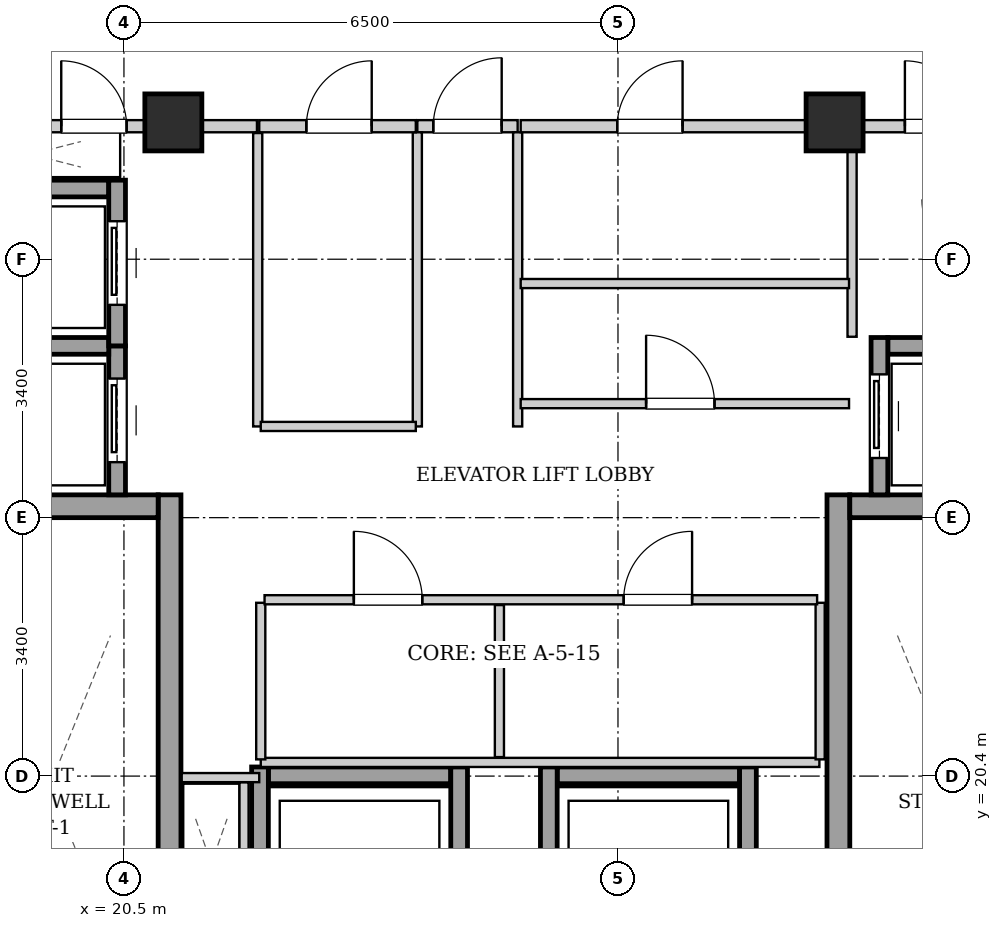
"""IFC4 building model, lengths in metres.
Left out: names, types, materials, properties, quantities, classifications, styles, units other than length and angle.
Written with IfcOpenShell. Run it as: python <this file> out.ifc"""

import sys

from ifc_helpers import new_model, si_unit, direction, frame, frame_2d, origin, origin_2d, place, context, subcontext, project, spatial, rectangle, extrude, element, fill, save


model = new_model("IFC4")
c1 = context("Model", 3, precision=1e-05, world=origin(), true_north=direction((0.0, 1.0)))
c2 = subcontext(c1, "Body", "Model", "MODEL_VIEW")
j1 = project(units=[si_unit("LENGTHUNIT", "METRE"), si_unit("PLANEANGLEUNIT", "RADIAN")], contexts=[c1])
p1 = place(None, origin())
s1 = spatial("IfcSite", under=j1, at=p1, CompositionType="ELEMENT")
p2 = place(p1, origin())
s2 = spatial("IfcBuilding", under=s1, at=p2, CompositionType="ELEMENT")
p3 = place(p2, frame((0.0, 0.0, 251.3)))
s3 = spatial("IfcBuildingStorey", under=s2, at=p3, CompositionType="ELEMENT", Elevation=251.3)
for number, where, z_axis, x_axis in (
    (1, (21.15, 29.0, 0.0), (0.0, 0.0, 1.0), (1.0, 0.0, 0.0)),
    (2, (29.85, 29.0, 0.0), (0.0, 0.0, 1.0), (1.0, 0.0, 0.0)),
):
    element("IfcColumn", number, at=place(p3, frame(where, z_axis=z_axis, x_axis=x_axis)), inside=s3, PredefinedType="COLUMN", context=c2, shape_type="SweptSolid", body=[
        extrude(rectangle(XDim=0.75, YDim=0.75, at=origin_2d()), origin(), (0.0, 0.0, 1.0), 3.4),
    ])
p4 = place(p3, frame((21.1, 15.1, 0.0), z_axis=(0.0, 0.0, 1.0), x_axis=(0.0, 1.0, 0.0)))
e3 = element("IfcWall", 3, at=p4, inside=s3, PredefinedType="SHEAR", context=c2, shape_type="SweptSolid", body=[
    extrude(rectangle(XDim=9.0, YDim=0.3, at=frame_2d((4.5, 0.0))), origin(), (0.0, 0.0, 1.0), 3.14),
])
p5 = place(p3, frame((18.1, 23.95, 0.0), z_axis=(0.0, 0.0, 1.0), x_axis=(1.0, 0.0, 0.0)))
e4 = element("IfcWall", 4, at=p5, inside=s3, PredefinedType="SHEAR", context=c2, shape_type="SweptSolid", body=[
    extrude(rectangle(XDim=2.85, YDim=0.3, at=frame_2d((1.425, 0.0))), origin(), (0.0, 0.0, 1.0), 3.14),
])
p6 = place(p3, frame((29.9, 15.1, 0.0), z_axis=(0.0, 0.0, 1.0), x_axis=(0.0, 1.0, 0.0)))
e5 = element("IfcWall", 5, at=p6, inside=s3, PredefinedType="SHEAR", context=c2, shape_type="SweptSolid", body=[
    extrude(rectangle(XDim=9.0, YDim=0.3, at=frame_2d((4.5, 0.0))), origin(), (0.0, 0.0, 1.0), 3.14),
])
p7 = place(p3, frame((30.05, 23.95, 0.0), z_axis=(0.0, 0.0, 1.0), x_axis=(1.0, 0.0, 0.0)))
e6 = element("IfcWall", 6, at=p7, inside=s3, PredefinedType="SHEAR", context=c2, shape_type="SweptSolid", body=[
    extrude(rectangle(XDim=2.85, YDim=0.3, at=frame_2d((1.425, 0.0))), origin(), (0.0, 0.0, 1.0), 3.14),
])
p8 = place(p3, frame((20.41, 24.1, 0.0), z_axis=(0.0, 0.0, 1.0), x_axis=(0.0, 1.0, 0.0)))
e7 = element("IfcWall", 7, at=p8, inside=s3, PredefinedType="SHEAR", context=c2, shape_type="SweptSolid", body=[
    extrude(rectangle(XDim=1.96, YDim=0.22, at=frame_2d((0.98, 0.0))), origin(), (0.0, 0.0, 1.0), 3.14),
])
p9 = place(p8, frame((0.43, 0.0, 0.0)))
e8 = element("IfcOpeningElement", 8, at=p9, cuts=e7, PredefinedType="OPENING", context=c2, shape_type="SweptSolid", body=[
    extrude(rectangle(XDim=1.1, YDim=2.15, at=frame_2d((0.55, 1.075))), frame((0.0, 0.12, 0.0), z_axis=(0.0, -1.0, 0.0), x_axis=(1.0, 0.0, 0.0)), (0.0, 0.0, 1.0), 0.24),
])
for number, where, z_axis, x_axis in (
    (9, (18.4, 26.06, 0.0), (0.0, 0.0, 1.0), (1.0, 0.0, 0.0)),
    (10, (18.4, 28.13, 0.0), (0.0, 0.0, 1.0), (1.0, 0.0, 0.0)),
):
    element("IfcWall", number, at=place(p3, frame(where, z_axis=z_axis, x_axis=x_axis)), inside=s3, PredefinedType="SHEAR", context=c2, shape_type="SweptSolid", body=[
        extrude(rectangle(XDim=1.9, YDim=0.22, at=frame_2d((0.95, 0.0))), origin(), (0.0, 0.0, 1.0), 3.14),
    ])
p10 = place(p3, frame((20.41, 26.06, 0.0), z_axis=(0.0, 0.0, 1.0), x_axis=(0.0, 1.0, 0.0)))
e11 = element("IfcWall", 11, at=p10, inside=s3, PredefinedType="SHEAR", context=c2, shape_type="SweptSolid", body=[
    extrude(rectangle(XDim=2.18, YDim=0.22, at=frame_2d((1.09, 0.0))), origin(), (0.0, 0.0, 1.0), 3.14),
])
p11 = place(p10, frame((0.54, 0.0, 0.0)))
e12 = element("IfcOpeningElement", 12, at=p11, cuts=e11, PredefinedType="OPENING", context=c2, shape_type="SweptSolid", body=[
    extrude(rectangle(XDim=1.1, YDim=2.15, at=frame_2d((0.55, 1.075))), frame((0.0, 0.12, 0.0), z_axis=(0.0, -1.0, 0.0), x_axis=(1.0, 0.0, 0.0)), (0.0, 0.0, 1.0), 0.24),
])
p12 = place(p3, frame((30.55, 26.06, 0.0), z_axis=(0.0, 0.0, 1.0), x_axis=(1.0, 0.0, 0.0)))
e13 = element("IfcWall", 13, at=p12, inside=s3, PredefinedType="SHEAR", context=c2, shape_type="SweptSolid", body=[
    extrude(rectangle(XDim=1.9, YDim=0.22, at=frame_2d((0.95, 0.0))), origin(), (0.0, 0.0, 1.0), 3.14),
])
p13 = place(p3, frame((30.44, 24.1, 0.0), z_axis=(0.0, 0.0, 1.0), x_axis=(0.0, 1.0, 0.0)))
e14 = element("IfcWall", 14, at=p13, inside=s3, PredefinedType="SHEAR", context=c2, shape_type="SweptSolid", body=[
    extrude(rectangle(XDim=2.07, YDim=0.22, at=frame_2d((1.035, 0.0))), origin(), (0.0, 0.0, 1.0), 3.14),
])
p14 = place(p13, frame((0.485, 0.0, 0.0)))
e15 = element("IfcOpeningElement", 15, at=p14, cuts=e14, PredefinedType="OPENING", context=c2, shape_type="SweptSolid", body=[
    extrude(rectangle(XDim=1.1, YDim=2.15, at=frame_2d((0.55, 1.075))), frame((0.0, 0.12, 0.0), z_axis=(0.0, -1.0, 0.0), x_axis=(1.0, 0.0, 0.0)), (0.0, 0.0, 1.0), 0.24),
])
p15 = place(p3, frame((22.4, 20.41, 0.0), z_axis=(0.0, 0.0, 1.0), x_axis=(1.0, 0.0, 0.0)))
e16 = element("IfcWall", 16, at=p15, inside=s3, PredefinedType="SHEAR", context=c2, shape_type="SweptSolid", body=[
    extrude(rectangle(XDim=2.4, YDim=0.22, at=frame_2d((1.2, 0.0))), origin(), (0.0, 0.0, 1.0), 3.14),
])
for number, where, z_axis, x_axis in (
    (17, (22.29, 17.98, 0.0), (0.0, 0.0, 1.0), (0.0, 1.0, 0.0)),
    (18, (24.91, 17.98, 0.0), (0.0, 0.0, 1.0), (0.0, 1.0, 0.0)),
):
    element("IfcWall", number, at=place(p3, frame(where, z_axis=z_axis, x_axis=x_axis)), inside=s3, PredefinedType="SHEAR", context=c2, shape_type="SweptSolid", body=[
        extrude(rectangle(XDim=2.54, YDim=0.22, at=frame_2d((1.27, 0.0))), origin(), (0.0, 0.0, 1.0), 3.14),
    ])
p16 = place(p3, frame((26.2, 20.41, 0.0), z_axis=(0.0, 0.0, 1.0), x_axis=(1.0, 0.0, 0.0)))
e19 = element("IfcWall", 19, at=p16, inside=s3, PredefinedType="SHEAR", context=c2, shape_type="SweptSolid", body=[
    extrude(rectangle(XDim=2.4, YDim=0.22, at=frame_2d((1.2, 0.0))), origin(), (0.0, 0.0, 1.0), 3.14),
])
for number, where, z_axis, x_axis in (
    (20, (26.09, 17.98, 0.0), (0.0, 0.0, 1.0), (0.0, 1.0, 0.0)),
    (21, (28.71, 17.98, 0.0), (0.0, 0.0, 1.0), (0.0, 1.0, 0.0)),
):
    element("IfcWall", number, at=place(p3, frame(where, z_axis=z_axis, x_axis=x_axis)), inside=s3, PredefinedType="SHEAR", context=c2, shape_type="SweptSolid", body=[
        extrude(rectangle(XDim=2.54, YDim=0.22, at=frame_2d((1.27, 0.0))), origin(), (0.0, 0.0, 1.0), 3.14),
    ])
p17 = place(p3, frame((24.36, 28.95, 0.0), z_axis=(0.0, 0.0, 1.0), x_axis=(1.0, 0.0, 0.0)))
e22 = element("IfcWall", 22, at=p17, inside=s3, PredefinedType="PARTITIONING", context=c2, shape_type="SweptSolid", body=[
    extrude(rectangle(XDim=1.32, YDim=0.16, at=frame_2d((0.66, 0.0))), origin(), (0.0, 0.0, 1.0), 2.668),
])
p18 = place(p17, frame((0.21, 0.0, 0.0)))
e23 = element("IfcOpeningElement", 23, at=p18, cuts=e22, PredefinedType="OPENING", context=c2, shape_type="SweptSolid", body=[
    extrude(rectangle(XDim=0.9, YDim=2.05, at=frame_2d((0.45, 1.025))), frame((0.0, 0.09, 0.0), z_axis=(0.0, -1.0, 0.0), x_axis=(1.0, 0.0, 0.0)), (0.0, 0.0, 1.0), 0.18),
])
p19 = place(p3, frame((17.96, 28.95, 0.0), z_axis=(0.0, 0.0, 1.0), x_axis=(1.0, 0.0, 0.0)))
e24 = element("IfcWall", 24, at=p19, inside=s3, PredefinedType="PARTITIONING", context=c2, shape_type="SweptSolid", body=[
    extrude(rectangle(XDim=4.29, YDim=0.16, at=frame_2d((2.145, 0.0))), origin(), (0.0, 0.0, 1.0), 2.668),
])
p20 = place(p19, frame((1.715, 0.0, 0.0)))
e25 = element("IfcOpeningElement", 25, at=p20, cuts=e24, PredefinedType="OPENING", context=c2, shape_type="SweptSolid", body=[
    extrude(rectangle(XDim=0.86, YDim=2.05, at=frame_2d((0.43, 1.025))), frame((0.0, 0.09, 0.0), z_axis=(0.0, -1.0, 0.0), x_axis=(1.0, 0.0, 0.0)), (0.0, 0.0, 1.0), 0.18),
])
p21 = place(p3, frame((22.08, 18.2, 0.0), z_axis=(0.0, 0.0, 1.0), x_axis=(0.0, 1.0, 0.0)))
e26 = element("IfcWall", 26, at=p21, inside=s3, PredefinedType="PARTITIONING", context=c2, shape_type="SweptSolid", body=[
    extrude(rectangle(XDim=2.12, YDim=0.12, at=frame_2d((1.06, 0.0))), origin(), (0.0, 0.0, 1.0), 3.14),
])
p22 = place(p3, frame((22.28, 20.38, 0.0), z_axis=(0.0, 0.0, 1.0), x_axis=(-1.0, 0.0, 0.0)))
e27 = element("IfcWall", 27, at=p22, inside=s3, PredefinedType="PARTITIONING", context=c2, shape_type="SweptSolid", body=[
    extrude(rectangle(XDim=1.02, YDim=0.12, at=frame_2d((0.51, 0.0))), origin(), (0.0, 0.0, 1.0), 3.14),
])
for number, where, z_axis, x_axis in (
    (28, (24.36, 25.0, 0.0), (0.0, 0.0, 1.0), (0.0, 1.0, 0.0)),
    (29, (25.68, 25.0, 0.0), (0.0, 0.0, 1.0), (0.0, 1.0, 0.0)),
):
    element("IfcWall", number, at=place(p3, frame(where, z_axis=z_axis, x_axis=x_axis)), inside=s3, PredefinedType="PARTITIONING", context=c2, shape_type="SweptSolid", body=[
        extrude(rectangle(XDim=3.87, YDim=0.12, at=frame_2d((1.935, 0.0))), origin(), (0.0, 0.0, 1.0), 3.14),
    ])
p23 = place(p3, frame((30.08, 26.18, 0.0), z_axis=(0.0, 0.0, 1.0), x_axis=(0.0, 1.0, 0.0)))
e30 = element("IfcWall", 30, at=p23, inside=s3, PredefinedType="PARTITIONING", context=c2, shape_type="SweptSolid", body=[
    extrude(rectangle(XDim=2.68, YDim=0.12, at=frame_2d((1.34, 0.0))), origin(), (0.0, 0.0, 1.0), 3.14),
])
p24 = place(p3, frame((30.08, 28.95, 0.0), z_axis=(0.0, 0.0, 1.0), x_axis=(1.0, 0.0, 0.0)))
e31 = element("IfcWall", 31, at=p24, inside=s3, PredefinedType="PARTITIONING", context=c2, shape_type="SweptSolid", body=[
    extrude(rectangle(XDim=2.96, YDim=0.16, at=frame_2d((1.48, 0.0))), origin(), (0.0, 0.0, 1.0), 3.14),
])
p25 = place(p24, frame((0.695, 0.0, 0.0)))
e32 = element("IfcOpeningElement", 32, at=p25, cuts=e31, PredefinedType="OPENING", context=c2, shape_type="SweptSolid", body=[
    extrude(rectangle(XDim=0.86, YDim=2.05, at=frame_2d((0.43, 1.025))), frame((0.0, 0.09, 0.0), z_axis=(0.0, -1.0, 0.0), x_axis=(1.0, 0.0, 0.0)), (0.0, 0.0, 1.0), 0.18),
])
p26 = place(p3, frame((22.26, 25.0, 0.0), z_axis=(0.0, 0.0, 1.0), x_axis=(0.0, 1.0, 0.0)))
e33 = element("IfcWall", 33, at=p26, inside=s3, PredefinedType="PARTITIONING", context=c2, shape_type="SweptSolid", body=[
    extrude(rectangle(XDim=3.86, YDim=0.12, at=frame_2d((1.93, 0.0))), origin(), (0.0, 0.0, 1.0), 3.14),
])
p27 = place(p3, frame((22.3, 25.0, 0.0), z_axis=(0.0, 0.0, 1.0), x_axis=(1.0, 0.0, 0.0)))
e34 = element("IfcWall", 34, at=p27, inside=s3, PredefinedType="PARTITIONING", context=c2, shape_type="SweptSolid", body=[
    extrude(rectangle(XDim=2.04, YDim=0.12, at=frame_2d((1.02, 0.0))), origin(), (0.0, 0.0, 1.0), 3.14),
])
p28 = place(p3, frame((22.28, 28.95, 0.0), z_axis=(0.0, 0.0, 1.0), x_axis=(1.0, 0.0, 0.0)))
e35 = element("IfcWall", 35, at=p28, inside=s3, PredefinedType="PARTITIONING", context=c2, shape_type="SweptSolid", body=[
    extrude(rectangle(XDim=2.06, YDim=0.16, at=frame_2d((1.03, 0.0))), origin(), (0.0, 0.0, 1.0), 2.668),
])
p29 = place(p28, frame((0.62, 0.0, 0.0)))
e36 = element("IfcOpeningElement", 36, at=p29, cuts=e35, PredefinedType="OPENING", context=c2, shape_type="SweptSolid", body=[
    extrude(rectangle(XDim=0.86, YDim=2.05, at=frame_2d((0.43, 1.025))), frame((0.0, 0.09, 0.0), z_axis=(0.0, -1.0, 0.0), x_axis=(1.0, 0.0, 0.0)), (0.0, 0.0, 1.0), 0.18),
])
p30 = place(p3, frame((25.72, 26.88, 0.0), z_axis=(0.0, 0.0, 1.0), x_axis=(1.0, 0.0, 0.0)))
e37 = element("IfcWall", 37, at=p30, inside=s3, PredefinedType="PARTITIONING", context=c2, shape_type="SweptSolid", body=[
    extrude(rectangle(XDim=4.32, YDim=0.12, at=frame_2d((2.16, 0.0))), origin(), (0.0, 0.0, 1.0), 3.14),
])
p31 = place(p3, frame((25.72, 25.3, 0.0), z_axis=(0.0, 0.0, 1.0), x_axis=(1.0, 0.0, 0.0)))
e38 = element("IfcWall", 38, at=p31, inside=s3, PredefinedType="PARTITIONING", context=c2, shape_type="SweptSolid", body=[
    extrude(rectangle(XDim=4.32, YDim=0.12, at=frame_2d((2.16, 0.0))), origin(), (0.0, 0.0, 1.0), 3.14),
])
p32 = place(p31, frame((1.65, 0.0, 0.0)))
e39 = element("IfcOpeningElement", 39, at=p32, cuts=e38, PredefinedType="OPENING", context=c2, shape_type="SweptSolid", body=[
    extrude(rectangle(XDim=0.9, YDim=2.05, at=frame_2d((0.45, 1.025))), frame((0.0, 0.07, 0.0), z_axis=(0.0, -1.0, 0.0), x_axis=(1.0, 0.0, 0.0)), (0.0, 0.0, 1.0), 0.14),
])
p33 = place(p3, frame((25.72, 28.95, 0.0), z_axis=(0.0, 0.0, 1.0), x_axis=(1.0, 0.0, 0.0)))
e40 = element("IfcWall", 40, at=p33, inside=s3, PredefinedType="PARTITIONING", context=c2, shape_type="SweptSolid", body=[
    extrude(rectangle(XDim=4.32, YDim=0.16, at=frame_2d((2.16, 0.0))), origin(), (0.0, 0.0, 1.0), 2.668),
])
p34 = place(p33, frame((1.27, 0.0, 0.0)))
e41 = element("IfcOpeningElement", 41, at=p34, cuts=e40, PredefinedType="OPENING", context=c2, shape_type="SweptSolid", body=[
    extrude(rectangle(XDim=0.86, YDim=2.05, at=frame_2d((0.43, 1.025))), frame((0.0, 0.09, 0.0), z_axis=(0.0, -1.0, 0.0), x_axis=(1.0, 0.0, 0.0)), (0.0, 0.0, 1.0), 0.18),
])
p35 = place(p3, frame((22.3, 20.58, 0.0), z_axis=(0.0, 0.0, 1.0), x_axis=(1.0, 0.0, 0.0)))
e42 = element("IfcWall", 42, at=p35, inside=s3, PredefinedType="PARTITIONING", context=c2, shape_type="SweptSolid", body=[
    extrude(rectangle(XDim=7.35, YDim=0.12, at=frame_2d((3.675, 0.0))), origin(), (0.0, 0.0, 1.0), 3.14),
])
for number, where, z_axis, x_axis in (
    (43, (22.3, 20.62, 0.0), (0.0, 0.0, 1.0), (0.0, 1.0, 0.0)),
    (44, (29.66, 20.62, 0.0), (0.0, 0.0, 1.0), (0.0, 1.0, 0.0)),
):
    element("IfcWall", number, at=place(p3, frame(where, z_axis=z_axis, x_axis=x_axis)), inside=s3, PredefinedType="PARTITIONING", context=c2, shape_type="SweptSolid", body=[
        extrude(rectangle(XDim=2.06, YDim=0.12, at=frame_2d((1.03, 0.0))), origin(), (0.0, 0.0, 1.0), 3.14),
    ])
p36 = place(p3, frame((25.44, 20.65, 0.0), z_axis=(0.0, 0.0, 1.0), x_axis=(0.0, 1.0, 0.0)))
e45 = element("IfcWall", 45, at=p36, inside=s3, PredefinedType="PARTITIONING", context=c2, shape_type="SweptSolid", body=[
    extrude(rectangle(XDim=2.0, YDim=0.12, at=frame_2d((1.0, 0.0))), origin(), (0.0, 0.0, 1.0), 3.14),
])
p37 = place(p3, frame((22.35, 22.72, 0.0), z_axis=(0.0, 0.0, 1.0), x_axis=(1.0, 0.0, 0.0)))
e46 = element("IfcWall", 46, at=p37, inside=s3, PredefinedType="PARTITIONING", context=c2, shape_type="SweptSolid", body=[
    extrude(rectangle(XDim=7.27, YDim=0.12, at=frame_2d((3.635, 0.0))), origin(), (0.0, 0.0, 1.0), 3.14),
])
p38 = place(p37, frame((1.175, 0.0, 0.0)))
e47 = element("IfcOpeningElement", 47, at=p38, cuts=e46, PredefinedType="OPENING", context=c2, shape_type="SweptSolid", body=[
    extrude(rectangle(XDim=0.9, YDim=2.05, at=frame_2d((0.45, 1.025))), frame((0.0, 0.07, 0.0), z_axis=(0.0, -1.0, 0.0), x_axis=(1.0, 0.0, 0.0)), (0.0, 0.0, 1.0), 0.14),
])
p39 = place(p37, frame((4.725, 0.0, 0.0)))
e48 = element("IfcOpeningElement", 48, at=p39, cuts=e46, PredefinedType="OPENING", context=c2, shape_type="SweptSolid", body=[
    extrude(rectangle(XDim=0.9, YDim=2.05, at=frame_2d((0.45, 1.025))), frame((0.0, 0.07, 0.0), z_axis=(0.0, -1.0, 0.0), x_axis=(1.0, 0.0, 0.0)), (0.0, 0.0, 1.0), 0.14),
])
p40 = place(p9, origin())
e49 = element("IfcDoor", 49, at=p40, inside=s3, OperationType="SLIDING_TO_LEFT", PredefinedType="DOOR", context=c2, shape_type="SweptSolid", body=[
    extrude(rectangle(XDim=1.1, YDim=2.15, at=frame_2d((0.55, 1.075))), frame((0.0, 0.025, 0.0), z_axis=(0.0, -1.0, 0.0), x_axis=(1.0, 0.0, 0.0)), (0.0, 0.0, 1.0), 0.05),
])
fill(e8, e49)
p41 = place(p11, origin())
e50 = element("IfcDoor", 50, at=p41, inside=s3, OperationType="SLIDING_TO_LEFT", PredefinedType="DOOR", context=c2, shape_type="SweptSolid", body=[
    extrude(rectangle(XDim=1.1, YDim=2.15, at=frame_2d((0.55, 1.075))), frame((0.0, 0.025, 0.0), z_axis=(0.0, -1.0, 0.0), x_axis=(1.0, 0.0, 0.0)), (0.0, 0.0, 1.0), 0.05),
])
fill(e12, e50)
p42 = place(p14, origin())
e51 = element("IfcDoor", 51, at=p42, inside=s3, OperationType="SLIDING_TO_LEFT", PredefinedType="DOOR", context=c2, shape_type="SweptSolid", body=[
    extrude(rectangle(XDim=1.1, YDim=2.15, at=frame_2d((0.55, 1.075))), frame((0.0, 0.025, 0.0), z_axis=(0.0, -1.0, 0.0), x_axis=(1.0, 0.0, 0.0)), (0.0, 0.0, 1.0), 0.05),
])
fill(e15, e51)
p43 = place(p18, origin())
e52 = element("IfcDoor", 52, at=p43, inside=s3, OperationType="SINGLE_SWING_RIGHT", PredefinedType="DOOR", context=c2, shape_type="SweptSolid", body=[
    extrude(rectangle(XDim=0.9, YDim=2.05, at=frame_2d((0.45, 1.025))), frame((0.0, 0.025, 0.0), z_axis=(0.0, -1.0, 0.0), x_axis=(1.0, 0.0, 0.0)), (0.0, 0.0, 1.0), 0.05),
])
fill(e23, e52)
p44 = place(p20, origin())
e53 = element("IfcDoor", 53, at=p44, inside=s3, OperationType="SINGLE_SWING_LEFT", PredefinedType="DOOR", context=c2, shape_type="SweptSolid", body=[
    extrude(rectangle(XDim=0.86, YDim=2.05, at=frame_2d((0.43, 1.025))), frame((0.0, 0.025, 0.0), z_axis=(0.0, -1.0, 0.0), x_axis=(1.0, 0.0, 0.0)), (0.0, 0.0, 1.0), 0.05),
])
fill(e25, e53)
p45 = place(p25, origin())
e54 = element("IfcDoor", 54, at=p45, inside=s3, OperationType="SINGLE_SWING_LEFT", PredefinedType="DOOR", context=c2, shape_type="SweptSolid", body=[
    extrude(rectangle(XDim=0.86, YDim=2.05, at=frame_2d((0.43, 1.025))), frame((0.0, 0.025, 0.0), z_axis=(0.0, -1.0, 0.0), x_axis=(1.0, 0.0, 0.0)), (0.0, 0.0, 1.0), 0.05),
])
fill(e32, e54)
p46 = place(p29, origin())
e55 = element("IfcDoor", 55, at=p46, inside=s3, OperationType="SINGLE_SWING_RIGHT", PredefinedType="DOOR", context=c2, shape_type="SweptSolid", body=[
    extrude(rectangle(XDim=0.86, YDim=2.05, at=frame_2d((0.43, 1.025))), frame((0.0, 0.025, 0.0), z_axis=(0.0, -1.0, 0.0), x_axis=(1.0, 0.0, 0.0)), (0.0, 0.0, 1.0), 0.05),
])
fill(e36, e55)
p47 = place(p32, origin())
e56 = element("IfcDoor", 56, at=p47, inside=s3, OperationType="SINGLE_SWING_LEFT", PredefinedType="DOOR", context=c2, shape_type="SweptSolid", body=[
    extrude(rectangle(XDim=0.9, YDim=2.05, at=frame_2d((0.45, 1.025))), frame((0.0, 0.025, 0.0), z_axis=(0.0, -1.0, 0.0), x_axis=(1.0, 0.0, 0.0)), (0.0, 0.0, 1.0), 0.05),
])
fill(e39, e56)
p48 = place(p34, origin())
e57 = element("IfcDoor", 57, at=p48, inside=s3, OperationType="SINGLE_SWING_RIGHT", PredefinedType="DOOR", context=c2, shape_type="SweptSolid", body=[
    extrude(rectangle(XDim=0.86, YDim=2.05, at=frame_2d((0.43, 1.025))), frame((0.0, 0.025, 0.0), z_axis=(0.0, -1.0, 0.0), x_axis=(1.0, 0.0, 0.0)), (0.0, 0.0, 1.0), 0.05),
])
fill(e41, e57)
p49 = place(p38, origin())
e58 = element("IfcDoor", 58, at=p49, inside=s3, OperationType="SINGLE_SWING_LEFT", PredefinedType="DOOR", context=c2, shape_type="SweptSolid", body=[
    extrude(rectangle(XDim=0.9, YDim=2.05, at=frame_2d((0.45, 1.025))), frame((0.0, 0.025, 0.0), z_axis=(0.0, -1.0, 0.0), x_axis=(1.0, 0.0, 0.0)), (0.0, 0.0, 1.0), 0.05),
])
fill(e47, e58)
p50 = place(p39, origin())
e59 = element("IfcDoor", 59, at=p50, inside=s3, OperationType="SINGLE_SWING_RIGHT", PredefinedType="DOOR", context=c2, shape_type="SweptSolid", body=[
    extrude(rectangle(XDim=0.9, YDim=2.05, at=frame_2d((0.45, 1.025))), frame((0.0, 0.025, 0.0), z_axis=(0.0, -1.0, 0.0), x_axis=(1.0, 0.0, 0.0)), (0.0, 0.0, 1.0), 0.05),
])
fill(e48, e59)
save(model, sys.argv[1])
